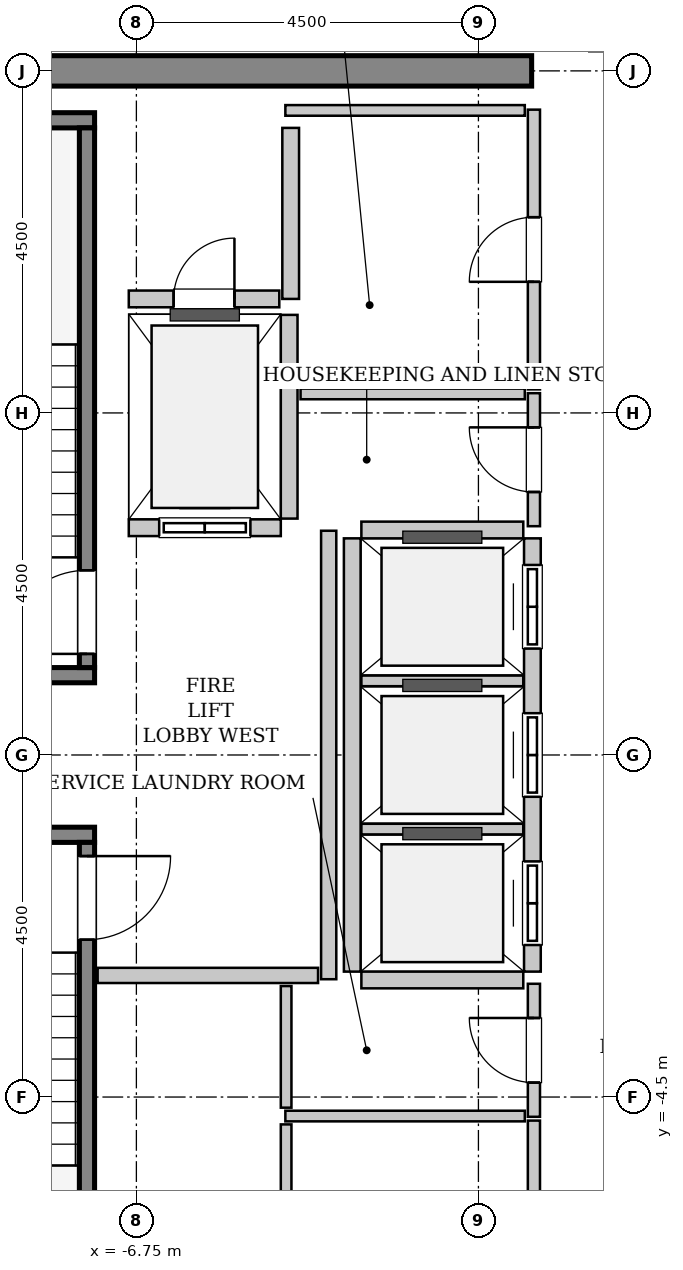
"""IFC4 building model, lengths in metres.
Left out: names, types, materials, properties, quantities, classifications, styles, units other than length and angle.
Written with IfcOpenShell. Run it as: python <this file> out.ifc"""

import sys

from ifc_helpers import new_model, si_unit, direction, frame, frame_2d, origin, place, context, subcontext, project, spatial, rectangle, extrude, source, transform, mapped, element, fill, save


model = new_model("IFC4")
c1 = context("Model", 3, precision=1e-05, world=origin(), true_north=direction((0.0, 1.0)))
c2 = subcontext(c1, "Body", "Model", "MODEL_VIEW")
j1 = project(units=[si_unit("LENGTHUNIT", "METRE"), si_unit("PLANEANGLEUNIT", "RADIAN")], contexts=[c1])
p1 = place(None, origin())
s1 = spatial("IfcSite", under=j1, at=p1, CompositionType="ELEMENT")
p2 = place(p1, origin())
s2 = spatial("IfcBuilding", under=s1, at=p2, CompositionType="ELEMENT")
p3 = place(p2, frame((0.0, 0.0, 345.2)))
s3 = spatial("IfcBuildingStorey", under=s2, at=p3, CompositionType="ELEMENT", Elevation=345.2)
m1 = source(origin(), c2, "Body", "SweptSolid", [
    extrude(rectangle(XDim=9.9, YDim=0.4, at=frame_2d((4.95, 0.0))), origin(), (0.0, 0.0, 1.0), 3.8),
])
p4 = place(p3, frame((-11.45, 9.0, 0.0), z_axis=(0.0, 0.0, 1.0), x_axis=(1.0, 0.0, 0.0)))
e1 = element("IfcWall", 1, at=p4, inside=s3, PredefinedType="SHEAR", context=c2, shape_type="MappedRepresentation", body=[
    mapped(m1, transform((0.0, 0.0, 0.0), x_axis=(1.0, 0.0, 0.0), y_axis=(0.0, 1.0, 0.0), z_axis=(0.0, 0.0, 1.0), scale=1.0)),
])
m2 = source(origin(), c2, "Body", "SweptSolid", [
    extrude(rectangle(XDim=3.4, YDim=0.2, at=frame_2d((1.7, 0.0))), origin(), (0.0, 0.0, 1.0), 3.8),
])
p5 = place(p3, frame((-7.3, 1.05, 0.0), z_axis=(0.0, 0.0, 1.0), x_axis=(-1.0, 0.0, 0.0)))
e2 = element("IfcWall", 2, at=p5, inside=s3, PredefinedType="SOLIDWALL", context=c2, shape_type="MappedRepresentation", body=[
    mapped(m2, transform((0.0, 0.0, 0.0), x_axis=(1.0, 0.0, 0.0), y_axis=(0.0, 1.0, 0.0), z_axis=(0.0, 0.0, 1.0), scale=1.0)),
])
m3 = source(origin(), c2, "Body", "SweptSolid", [
    extrude(rectangle(XDim=3.755, YDim=0.2, at=frame_2d((1.877, 0.0))), origin(), (0.0, 0.0, 1.0), 3.8),
])
p6 = place(p3, frame((-7.3, 8.35, 0.0), z_axis=(0.0, 0.0, 1.0), x_axis=(-1.0, 0.0, 0.0)))
e3 = element("IfcWall", 3, at=p6, inside=s3, PredefinedType="SOLIDWALL", context=c2, shape_type="MappedRepresentation", body=[
    mapped(m3, transform((0.0, 0.0, 0.0), x_axis=(1.0, 0.0, 0.0), y_axis=(0.0, 1.0, 0.0), z_axis=(0.0, 0.0, 1.0), scale=1.0)),
])
m4 = source(origin(), c2, "Body", "SweptSolid", [
    extrude(rectangle(XDim=7.1, YDim=0.2, at=frame_2d((3.55, 0.0))), origin(), (0.0, 0.0, 1.0), 3.8),
])
p7 = place(p3, frame((-7.4, 1.15, 0.0), z_axis=(0.0, 0.0, 1.0), x_axis=(0.0, 1.0, 0.0)))
e4 = element("IfcWall", 4, at=p7, inside=s3, PredefinedType="SOLIDWALL", context=c2, shape_type="MappedRepresentation", body=[
    mapped(m4, transform((0.0, 0.0, 0.0), x_axis=(1.0, 0.0, 0.0), y_axis=(0.0, 1.0, 0.0), z_axis=(0.0, 0.0, 1.0), scale=1.0)),
])
p8 = place(p7, frame((0.18, 0.0, 0.0)))
e5 = element("IfcOpeningElement", 5, at=p8, cuts=e4, PredefinedType="OPENING", context=c2, shape_type="SweptSolid", body=[
    extrude(rectangle(XDim=1.1, YDim=2.15, at=frame_2d((0.55, 1.075))), frame((0.0, 0.11, 0.0), z_axis=(0.0, -1.0, 0.0), x_axis=(1.0, 0.0, 0.0)), (0.0, 0.0, 1.0), 0.22),
])
p9 = place(p3, frame((-10.7, -1.05, 0.0), z_axis=(0.0, 0.0, 1.0), x_axis=(1.0, 0.0, 0.0)))
e6 = element("IfcWall", 6, at=p9, inside=s3, PredefinedType="SOLIDWALL", context=c2, shape_type="MappedRepresentation", body=[
    mapped(m2, transform((0.0, 0.0, 0.0), x_axis=(1.0, 0.0, 0.0), y_axis=(0.0, 1.0, 0.0), z_axis=(0.0, 0.0, 1.0), scale=1.0)),
])
p10 = place(p3, frame((-7.4, -1.15, 0.0), z_axis=(0.0, 0.0, 1.0), x_axis=(0.0, -1.0, 0.0)))
e7 = element("IfcWall", 7, at=p10, inside=s3, PredefinedType="SOLIDWALL", context=c2, shape_type="MappedRepresentation", body=[
    mapped(m4, transform((0.0, 0.0, 0.0), x_axis=(1.0, 0.0, 0.0), y_axis=(0.0, 1.0, 0.0), z_axis=(0.0, 0.0, 1.0), scale=1.0)),
])
p11 = place(p10, frame((0.18, 0.0, 0.0)))
e8 = element("IfcOpeningElement", 8, at=p11, cuts=e7, PredefinedType="OPENING", context=c2, shape_type="SweptSolid", body=[
    extrude(rectangle(XDim=1.1, YDim=2.15, at=frame_2d((0.55, 1.075))), frame((0.0, 0.11, 0.0), z_axis=(0.0, -1.0, 0.0), x_axis=(1.0, 0.0, 0.0)), (0.0, 0.0, 1.0), 0.22),
])
m5 = source(origin(), c2, "Body", "SweptSolid", [
    extrude(rectangle(XDim=2.0, YDim=0.22, at=frame_2d((1.0, 0.0))), origin(), (0.0, 0.0, 1.0), 3.485),
])
p12 = place(p3, frame((-6.85, 2.99, 0.0), z_axis=(0.0, 0.0, 1.0), x_axis=(1.0, 0.0, 0.0)))
e9 = element("IfcWall", 9, at=p12, inside=s3, PredefinedType="SOLIDWALL", context=c2, shape_type="MappedRepresentation", body=[
    mapped(m5, transform((0.0, 0.0, 0.0), x_axis=(1.0, 0.0, 0.0), y_axis=(0.0, 1.0, 0.0), z_axis=(0.0, 0.0, 1.0), scale=1.0)),
])
p13 = place(p12, frame((0.4, 0.0, 0.0)))
e10 = element("IfcOpeningElement", 10, at=p13, cuts=e9, PredefinedType="OPENING", context=c2, shape_type="SweptSolid", body=[
    extrude(rectangle(XDim=1.2, YDim=2.2, at=frame_2d((0.6, 1.1))), frame((0.0, 0.12, 0.0), z_axis=(0.0, -1.0, 0.0), x_axis=(1.0, 0.0, 0.0)), (0.0, 0.0, 1.0), 0.24),
])
m6 = source(origin(), c2, "Body", "SweptSolid", [
    extrude(rectangle(XDim=2.68, YDim=0.22, at=frame_2d((1.34, 0.0))), origin(), (0.0, 0.0, 1.0), 3.485),
])
p14 = place(p3, frame((-4.74, 3.11, 0.0), z_axis=(0.0, 0.0, 1.0), x_axis=(0.0, 1.0, 0.0)))
e11 = element("IfcWall", 11, at=p14, inside=s3, PredefinedType="SOLIDWALL", context=c2, shape_type="MappedRepresentation", body=[
    mapped(m6, transform((0.0, 0.0, 0.0), x_axis=(1.0, 0.0, 0.0), y_axis=(0.0, 1.0, 0.0), z_axis=(0.0, 0.0, 1.0), scale=1.0)),
])
m7 = source(origin(), c2, "Body", "SweptSolid", [
    extrude(rectangle(XDim=5.7, YDim=0.22, at=frame_2d((2.85, 0.0))), origin(), (0.0, 0.0, 1.0), 3.485),
])
p15 = place(p3, frame((-1.54, -2.85, 0.0), z_axis=(0.0, 0.0, 1.0), x_axis=(0.0, 1.0, 0.0)))
e12 = element("IfcWall", 12, at=p15, inside=s3, PredefinedType="SOLIDWALL", context=c2, shape_type="MappedRepresentation", body=[
    mapped(m7, transform((0.0, 0.0, 0.0), x_axis=(1.0, 0.0, 0.0), y_axis=(0.0, 1.0, 0.0), z_axis=(0.0, 0.0, 1.0), scale=1.0)),
])
p16 = place(p15, frame((0.35, 0.0, 0.0)))
e13 = element("IfcOpeningElement", 13, at=p16, cuts=e12, PredefinedType="OPENING", context=c2, shape_type="SweptSolid", body=[
    extrude(rectangle(XDim=1.1, YDim=2.2, at=frame_2d((0.55, 1.1))), frame((0.0, 0.12, 0.0), z_axis=(0.0, -1.0, 0.0), x_axis=(1.0, 0.0, 0.0)), (0.0, 0.0, 1.0), 0.24),
])
p17 = place(p15, frame((2.3, 0.0, 0.0)))
e14 = element("IfcOpeningElement", 14, at=p17, cuts=e12, PredefinedType="OPENING", context=c2, shape_type="SweptSolid", body=[
    extrude(rectangle(XDim=1.1, YDim=2.2, at=frame_2d((0.55, 1.1))), frame((0.0, 0.12, 0.0), z_axis=(0.0, -1.0, 0.0), x_axis=(1.0, 0.0, 0.0)), (0.0, 0.0, 1.0), 0.24),
])
p18 = place(p15, frame((4.25, 0.0, 0.0)))
e15 = element("IfcOpeningElement", 15, at=p18, cuts=e12, PredefinedType="OPENING", context=c2, shape_type="SweptSolid", body=[
    extrude(rectangle(XDim=1.1, YDim=2.2, at=frame_2d((0.55, 1.1))), frame((0.0, 0.12, 0.0), z_axis=(0.0, -1.0, 0.0), x_axis=(1.0, 0.0, 0.0)), (0.0, 0.0, 1.0), 0.24),
])
p19 = place(p3, frame((-3.91, 2.85, 0.0), z_axis=(0.0, 0.0, 1.0), x_axis=(0.0, -1.0, 0.0)))
e16 = element("IfcWall", 16, at=p19, inside=s3, PredefinedType="SOLIDWALL", context=c2, shape_type="MappedRepresentation", body=[
    mapped(m7, transform((0.0, 0.0, 0.0), x_axis=(1.0, 0.0, 0.0), y_axis=(0.0, 1.0, 0.0), z_axis=(0.0, 0.0, 1.0), scale=1.0)),
])
m8 = source(origin(), c2, "Body", "SweptSolid", [
    extrude(rectangle(XDim=2.13, YDim=0.22, at=frame_2d((1.065, 0.0))), origin(), (0.0, 0.0, 1.0), 3.485),
])
p20 = place(p3, frame((-3.79, -2.96, 0.0), z_axis=(0.0, 0.0, 1.0), x_axis=(1.0, 0.0, 0.0)))
e17 = element("IfcWall", 17, at=p20, inside=s3, PredefinedType="SOLIDWALL", context=c2, shape_type="MappedRepresentation", body=[
    mapped(m8, transform((0.0, 0.0, 0.0), x_axis=(1.0, 0.0, 0.0), y_axis=(0.0, 1.0, 0.0), z_axis=(0.0, 0.0, 1.0), scale=1.0)),
])
m9 = source(origin(), c2, "Body", "SweptSolid", [
    extrude(rectangle(XDim=2.13, YDim=0.14, at=frame_2d((1.065, 0.0))), origin(), (0.0, 0.0, 1.0), 3.485),
])
for number, where, z_axis, x_axis in (
    (18, (-3.79, -0.975, 0.0), (0.0, 0.0, 1.0), (1.0, 0.0, 0.0)),
    (19, (-3.79, 0.975, 0.0), (0.0, 0.0, 1.0), (1.0, 0.0, 0.0)),
):
    element("IfcWall", number, at=place(p3, frame(where, z_axis=z_axis, x_axis=x_axis)), inside=s3, PredefinedType="PARTITIONING", context=c2, shape_type="MappedRepresentation", body=[
        mapped(m9, transform((0.0, 0.0, 0.0), x_axis=(1.0, 0.0, 0.0), y_axis=(0.0, 1.0, 0.0), z_axis=(0.0, 0.0, 1.0), scale=1.0)),
    ])
p21 = place(p3, frame((-1.66, 2.96, 0.0), z_axis=(0.0, 0.0, 1.0), x_axis=(-1.0, 0.0, 0.0)))
e20 = element("IfcWall", 20, at=p21, inside=s3, PredefinedType="SOLIDWALL", context=c2, shape_type="MappedRepresentation", body=[
    mapped(m8, transform((0.0, 0.0, 0.0), x_axis=(1.0, 0.0, 0.0), y_axis=(0.0, 1.0, 0.0), z_axis=(0.0, 0.0, 1.0), scale=1.0)),
])
m10 = source(origin(), c2, "Body", "SweptSolid", [
    extrude(rectangle(XDim=2.25, YDim=0.22, at=frame_2d((1.125, 0.0))), origin(), (0.0, 0.0, 1.0), 3.485),
])
p22 = place(p3, frame((-4.72, 6.0, 0.0), z_axis=(0.0, 0.0, 1.0), x_axis=(0.0, 1.0, 0.0)))
e21 = element("IfcWall", 21, at=p22, inside=s3, PredefinedType="SOLIDWALL", context=c2, shape_type="MappedRepresentation", body=[
    mapped(m10, transform((0.0, 0.0, 0.0), x_axis=(1.0, 0.0, 0.0), y_axis=(0.0, 1.0, 0.0), z_axis=(0.0, 0.0, 1.0), scale=1.0)),
])
m11 = source(origin(), c2, "Body", "SweptSolid", [
    extrude(rectangle(XDim=1.98, YDim=0.22, at=frame_2d((0.99, 0.0))), origin(), (0.0, 0.0, 1.0), 3.485),
])
p23 = place(p3, frame((-6.85, 6.0, 0.0), z_axis=(0.0, 0.0, 1.0), x_axis=(1.0, 0.0, 0.0)))
e22 = element("IfcWall", 22, at=p23, inside=s3, PredefinedType="SOLIDWALL", context=c2, shape_type="MappedRepresentation", body=[
    mapped(m11, transform((0.0, 0.0, 0.0), x_axis=(1.0, 0.0, 0.0), y_axis=(0.0, 1.0, 0.0), z_axis=(0.0, 0.0, 1.0), scale=1.0)),
])
p24 = place(p23, frame((0.59, 0.0, 0.0)))
e23 = element("IfcOpeningElement", 23, at=p24, cuts=e22, PredefinedType="OPENING", context=c2, shape_type="SweptSolid", body=[
    extrude(rectangle(XDim=0.8, YDim=2.0, at=frame_2d((0.4, 1.0))), frame((0.0, 0.12, 0.0), z_axis=(0.0, -1.0, 0.0), x_axis=(1.0, 0.0, 0.0)), (0.0, 0.0, 1.0), 0.24),
])
m12 = source(origin(), c2, "Body", "SweptSolid", [
    extrude(rectangle(XDim=5.9, YDim=0.2, at=frame_2d((2.95, 0.0))), origin(), (0.0, 0.0, 1.0), 3.485),
])
p25 = place(p3, frame((-4.22, -2.95, 0.0), z_axis=(0.0, 0.0, 1.0), x_axis=(0.0, 1.0, 0.0)))
e24 = element("IfcWall", 24, at=p25, inside=s3, PredefinedType="PARTITIONING", context=c2, shape_type="MappedRepresentation", body=[
    mapped(m12, transform((0.0, 0.0, 0.0), x_axis=(1.0, 0.0, 0.0), y_axis=(0.0, 1.0, 0.0), z_axis=(0.0, 0.0, 1.0), scale=1.0)),
])
m13 = source(origin(), c2, "Body", "SweptSolid", [
    extrude(rectangle(XDim=2.9, YDim=0.2, at=frame_2d((1.45, 0.0))), origin(), (0.0, 0.0, 1.0), 3.485),
])
p26 = place(p3, frame((-7.26, -2.9, 0.0), z_axis=(0.0, 0.0, 1.0), x_axis=(1.0, 0.0, 0.0)))
e25 = element("IfcWall", 25, at=p26, inside=s3, PredefinedType="PARTITIONING", context=c2, shape_type="MappedRepresentation", body=[
    mapped(m13, transform((0.0, 0.0, 0.0), x_axis=(1.0, 0.0, 0.0), y_axis=(0.0, 1.0, 0.0), z_axis=(0.0, 0.0, 1.0), scale=1.0)),
])
m14 = source(origin(), c2, "Body", "SweptSolid", [
    extrude(rectangle(XDim=1.75, YDim=0.16, at=frame_2d((0.875, 0.0))), origin(), (0.0, 0.0, 1.0), 3.485),
])
p27 = place(p3, frame((-1.52, 3.01, 0.0), z_axis=(0.0, 0.0, 1.0), x_axis=(0.0, 1.0, 0.0)))
e26 = element("IfcWall", 26, at=p27, inside=s3, PredefinedType="PARTITIONING", context=c2, shape_type="MappedRepresentation", body=[
    mapped(m14, transform((0.0, 0.0, 0.0), x_axis=(1.0, 0.0, 0.0), y_axis=(0.0, 1.0, 0.0), z_axis=(0.0, 0.0, 1.0), scale=1.0)),
])
p28 = place(p27, frame((0.45, 0.0, 0.0)))
e27 = element("IfcOpeningElement", 27, at=p28, cuts=e26, PredefinedType="OPENING", context=c2, shape_type="SweptSolid", body=[
    extrude(rectangle(XDim=0.85, YDim=2.1, at=frame_2d((0.425, 1.05))), frame((0.0, 0.09, 0.0), z_axis=(0.0, -1.0, 0.0), x_axis=(1.0, 0.0, 0.0)), (0.0, 0.0, 1.0), 0.18),
])
m15 = source(origin(), c2, "Body", "SweptSolid", [
    extrude(rectangle(XDim=2.95, YDim=0.14, at=frame_2d((1.475, 0.0))), origin(), (0.0, 0.0, 1.0), 3.485),
])
p29 = place(p3, frame((-4.59, 4.75, 0.0), z_axis=(0.0, 0.0, 1.0), x_axis=(1.0, 0.0, 0.0)))
e28 = element("IfcWall", 28, at=p29, inside=s3, PredefinedType="PARTITIONING", context=c2, shape_type="MappedRepresentation", body=[
    mapped(m15, transform((0.0, 0.0, 0.0), x_axis=(1.0, 0.0, 0.0), y_axis=(0.0, 1.0, 0.0), z_axis=(0.0, 0.0, 1.0), scale=1.0)),
])
m16 = source(origin(), c2, "Body", "SweptSolid", [
    extrude(rectangle(XDim=3.68, YDim=0.16, at=frame_2d((1.84, 0.0))), origin(), (0.0, 0.0, 1.0), 3.485),
])
p30 = place(p3, frame((-1.52, 4.81, 0.0), z_axis=(0.0, 0.0, 1.0), x_axis=(0.0, 1.0, 0.0)))
e29 = element("IfcWall", 29, at=p30, inside=s3, PredefinedType="PARTITIONING", context=c2, shape_type="MappedRepresentation", body=[
    mapped(m16, transform((0.0, 0.0, 0.0), x_axis=(1.0, 0.0, 0.0), y_axis=(0.0, 1.0, 0.0), z_axis=(0.0, 0.0, 1.0), scale=1.0)),
])
p31 = place(p30, frame((1.415, 0.0, 0.0)))
e30 = element("IfcOpeningElement", 30, at=p31, cuts=e29, PredefinedType="OPENING", context=c2, shape_type="SweptSolid", body=[
    extrude(rectangle(XDim=0.85, YDim=2.1, at=frame_2d((0.425, 1.05))), frame((0.0, 0.09, 0.0), z_axis=(0.0, -1.0, 0.0), x_axis=(1.0, 0.0, 0.0)), (0.0, 0.0, 1.0), 0.18),
])
m17 = source(origin(), c2, "Body", "SweptSolid", [
    extrude(rectangle(XDim=3.15, YDim=0.14, at=frame_2d((1.575, 0.0))), origin(), (0.0, 0.0, 1.0), 3.485),
])
p32 = place(p3, frame((-4.79, 8.48, 0.0), z_axis=(0.0, 0.0, 1.0), x_axis=(1.0, 0.0, 0.0)))
e31 = element("IfcWall", 31, at=p32, inside=s3, PredefinedType="PARTITIONING", context=c2, shape_type="MappedRepresentation", body=[
    mapped(m17, transform((0.0, 0.0, 0.0), x_axis=(1.0, 0.0, 0.0), y_axis=(0.0, 1.0, 0.0), z_axis=(0.0, 0.0, 1.0), scale=1.0)),
])
p33 = place(p3, frame((-1.52, -4.76, 0.0), z_axis=(0.0, 0.0, 1.0), x_axis=(0.0, 1.0, 0.0)))
e32 = element("IfcWall", 32, at=p33, inside=s3, PredefinedType="PARTITIONING", context=c2, shape_type="MappedRepresentation", body=[
    mapped(m14, transform((0.0, 0.0, 0.0), x_axis=(1.0, 0.0, 0.0), y_axis=(0.0, 1.0, 0.0), z_axis=(0.0, 0.0, 1.0), scale=1.0)),
])
p34 = place(p33, frame((0.45, 0.0, 0.0)))
e33 = element("IfcOpeningElement", 33, at=p34, cuts=e32, PredefinedType="OPENING", context=c2, shape_type="SweptSolid", body=[
    extrude(rectangle(XDim=0.85, YDim=2.1, at=frame_2d((0.425, 1.05))), frame((0.0, 0.09, 0.0), z_axis=(0.0, -1.0, 0.0), x_axis=(1.0, 0.0, 0.0)), (0.0, 0.0, 1.0), 0.18),
])
p35 = place(p3, frame((-4.79, -4.75, 0.0), z_axis=(0.0, 0.0, 1.0), x_axis=(1.0, 0.0, 0.0)))
e34 = element("IfcWall", 34, at=p35, inside=s3, PredefinedType="PARTITIONING", context=c2, shape_type="MappedRepresentation", body=[
    mapped(m17, transform((0.0, 0.0, 0.0), x_axis=(1.0, 0.0, 0.0), y_axis=(0.0, 1.0, 0.0), z_axis=(0.0, 0.0, 1.0), scale=1.0)),
])
m18 = source(origin(), c2, "Body", "SweptSolid", [
    extrude(rectangle(XDim=1.6, YDim=0.14, at=frame_2d((0.8, 0.0))), origin(), (0.0, 0.0, 1.0), 3.485),
])
p36 = place(p3, frame((-4.78, -4.64, 0.0), z_axis=(0.0, 0.0, 1.0), x_axis=(0.0, 1.0, 0.0)))
e35 = element("IfcWall", 35, at=p36, inside=s3, PredefinedType="PARTITIONING", context=c2, shape_type="MappedRepresentation", body=[
    mapped(m18, transform((0.0, 0.0, 0.0), x_axis=(1.0, 0.0, 0.0), y_axis=(0.0, 1.0, 0.0), z_axis=(0.0, 0.0, 1.0), scale=1.0)),
])
p37 = place(p3, frame((-1.52, -8.49, 0.0), z_axis=(0.0, 0.0, 1.0), x_axis=(0.0, 1.0, 0.0)))
e36 = element("IfcWall", 36, at=p37, inside=s3, PredefinedType="PARTITIONING", context=c2, shape_type="MappedRepresentation", body=[
    mapped(m16, transform((0.0, 0.0, 0.0), x_axis=(1.0, 0.0, 0.0), y_axis=(0.0, 1.0, 0.0), z_axis=(0.0, 0.0, 1.0), scale=1.0)),
])
p38 = place(p37, frame((1.415, 0.0, 0.0)))
e37 = element("IfcOpeningElement", 37, at=p38, cuts=e36, PredefinedType="OPENING", context=c2, shape_type="SweptSolid", body=[
    extrude(rectangle(XDim=0.85, YDim=2.1, at=frame_2d((0.425, 1.05))), frame((0.0, 0.09, 0.0), z_axis=(0.0, -1.0, 0.0), x_axis=(1.0, 0.0, 0.0)), (0.0, 0.0, 1.0), 0.18),
])
m19 = source(origin(), c2, "Body", "SweptSolid", [
    extrude(rectangle(XDim=3.63, YDim=0.14, at=frame_2d((1.815, 0.0))), origin(), (0.0, 0.0, 1.0), 3.485),
])
p39 = place(p3, frame((-4.78, -8.49, 0.0), z_axis=(0.0, 0.0, 1.0), x_axis=(0.0, 1.0, 0.0)))
e38 = element("IfcWall", 38, at=p39, inside=s3, PredefinedType="PARTITIONING", context=c2, shape_type="MappedRepresentation", body=[
    mapped(m19, transform((0.0, 0.0, 0.0), x_axis=(1.0, 0.0, 0.0), y_axis=(0.0, 1.0, 0.0), z_axis=(0.0, 0.0, 1.0), scale=1.0)),
])
m20 = source(origin(), c2, "Body", "SweptSolid", [
    extrude(rectangle(XDim=1.1, YDim=2.15, at=frame_2d((0.55, 1.075))), frame((0.0, 0.025, 0.0), z_axis=(0.0, -1.0, 0.0), x_axis=(1.0, 0.0, 0.0)), (0.0, 0.0, 1.0), 0.05),
])
p40 = place(p8, origin())
e39 = element("IfcDoor", 39, at=p40, inside=s3, OperationType="SINGLE_SWING_LEFT", PredefinedType="DOOR", context=c2, shape_type="MappedRepresentation", body=[
    mapped(m20, transform((0.0, 0.0, 0.0), x_axis=(1.0, 0.0, 0.0), y_axis=(0.0, 1.0, 0.0), z_axis=(0.0, 0.0, 1.0), scale=1.0)),
])
fill(e5, e39)
p41 = place(p11, origin())
e40 = element("IfcDoor", 40, at=p41, inside=s3, OperationType="SINGLE_SWING_LEFT", PredefinedType="DOOR", context=c2, shape_type="MappedRepresentation", body=[
    mapped(m20, transform((0.0, 0.0, 0.0), x_axis=(1.0, 0.0, 0.0), y_axis=(0.0, 1.0, 0.0), z_axis=(0.0, 0.0, 1.0), scale=1.0)),
])
fill(e8, e40)
m21 = source(origin(), c2, "Body", "SweptSolid", [
    extrude(rectangle(XDim=1.2, YDim=2.2, at=frame_2d((0.6, 1.1))), frame((0.0, 0.025, 0.0), z_axis=(0.0, -1.0, 0.0), x_axis=(1.0, 0.0, 0.0)), (0.0, 0.0, 1.0), 0.05),
])
p42 = place(p13, origin())
e41 = element("IfcDoor", 41, at=p42, inside=s3, OperationType="SLIDING_TO_LEFT", PredefinedType="DOOR", context=c2, shape_type="MappedRepresentation", body=[
    mapped(m21, transform((0.0, 0.0, 0.0), x_axis=(1.0, 0.0, 0.0), y_axis=(0.0, 1.0, 0.0), z_axis=(0.0, 0.0, 1.0), scale=1.0)),
])
fill(e10, e41)
m22 = source(origin(), c2, "Body", "SweptSolid", [
    extrude(rectangle(XDim=1.1, YDim=2.2, at=frame_2d((0.55, 1.1))), frame((0.0, 0.025, 0.0), z_axis=(0.0, -1.0, 0.0), x_axis=(1.0, 0.0, 0.0)), (0.0, 0.0, 1.0), 0.05),
])
p43 = place(p16, origin())
e42 = element("IfcDoor", 42, at=p43, inside=s3, OperationType="DOUBLE_DOOR_SLIDING", PredefinedType="DOOR", context=c2, shape_type="MappedRepresentation", body=[
    mapped(m22, transform((0.0, 0.0, 0.0), x_axis=(1.0, 0.0, 0.0), y_axis=(0.0, 1.0, 0.0), z_axis=(0.0, 0.0, 1.0), scale=1.0)),
])
fill(e13, e42)
p44 = place(p17, origin())
e43 = element("IfcDoor", 43, at=p44, inside=s3, OperationType="DOUBLE_DOOR_SLIDING", PredefinedType="DOOR", context=c2, shape_type="MappedRepresentation", body=[
    mapped(m22, transform((0.0, 0.0, 0.0), x_axis=(1.0, 0.0, 0.0), y_axis=(0.0, 1.0, 0.0), z_axis=(0.0, 0.0, 1.0), scale=1.0)),
])
fill(e14, e43)
p45 = place(p18, origin())
e44 = element("IfcDoor", 44, at=p45, inside=s3, OperationType="DOUBLE_DOOR_SLIDING", PredefinedType="DOOR", context=c2, shape_type="MappedRepresentation", body=[
    mapped(m22, transform((0.0, 0.0, 0.0), x_axis=(1.0, 0.0, 0.0), y_axis=(0.0, 1.0, 0.0), z_axis=(0.0, 0.0, 1.0), scale=1.0)),
])
fill(e15, e44)
m23 = source(origin(), c2, "Body", "SweptSolid", [
    extrude(rectangle(XDim=0.8, YDim=2.0, at=frame_2d((0.4, 1.0))), frame((0.0, 0.025, 0.0), z_axis=(0.0, -1.0, 0.0), x_axis=(1.0, 0.0, 0.0)), (0.0, 0.0, 1.0), 0.05),
])
p46 = place(p24, origin())
e45 = element("IfcDoor", 45, at=p46, inside=s3, OperationType="SINGLE_SWING_RIGHT", PredefinedType="TRAPDOOR", context=c2, shape_type="MappedRepresentation", body=[
    mapped(m23, transform((0.0, 0.0, 0.0), x_axis=(1.0, 0.0, 0.0), y_axis=(0.0, 1.0, 0.0), z_axis=(0.0, 0.0, 1.0), scale=1.0)),
])
fill(e23, e45)
m24 = source(origin(), c2, "Body", "SweptSolid", [
    extrude(rectangle(XDim=0.85, YDim=2.1, at=frame_2d((0.425, 1.05))), frame((0.0, 0.025, 0.0), z_axis=(0.0, -1.0, 0.0), x_axis=(1.0, 0.0, 0.0)), (0.0, 0.0, 1.0), 0.05),
])
p47 = place(p28, origin())
e46 = element("IfcDoor", 46, at=p47, inside=s3, OperationType="SINGLE_SWING_RIGHT", PredefinedType="DOOR", context=c2, shape_type="MappedRepresentation", body=[
    mapped(m24, transform((0.0, 0.0, 0.0), x_axis=(1.0, 0.0, 0.0), y_axis=(0.0, 1.0, 0.0), z_axis=(0.0, 0.0, 1.0), scale=1.0)),
])
fill(e27, e46)
p48 = place(p31, origin())
e47 = element("IfcDoor", 47, at=p48, inside=s3, OperationType="SINGLE_SWING_LEFT", PredefinedType="DOOR", context=c2, shape_type="MappedRepresentation", body=[
    mapped(m24, transform((0.0, 0.0, 0.0), x_axis=(1.0, 0.0, 0.0), y_axis=(0.0, 1.0, 0.0), z_axis=(0.0, 0.0, 1.0), scale=1.0)),
])
fill(e30, e47)
p49 = place(p34, origin())
e48 = element("IfcDoor", 48, at=p49, inside=s3, OperationType="SINGLE_SWING_RIGHT", PredefinedType="DOOR", context=c2, shape_type="MappedRepresentation", body=[
    mapped(m24, transform((0.0, 0.0, 0.0), x_axis=(1.0, 0.0, 0.0), y_axis=(0.0, 1.0, 0.0), z_axis=(0.0, 0.0, 1.0), scale=1.0)),
])
fill(e33, e48)
save(model, sys.argv[1])
